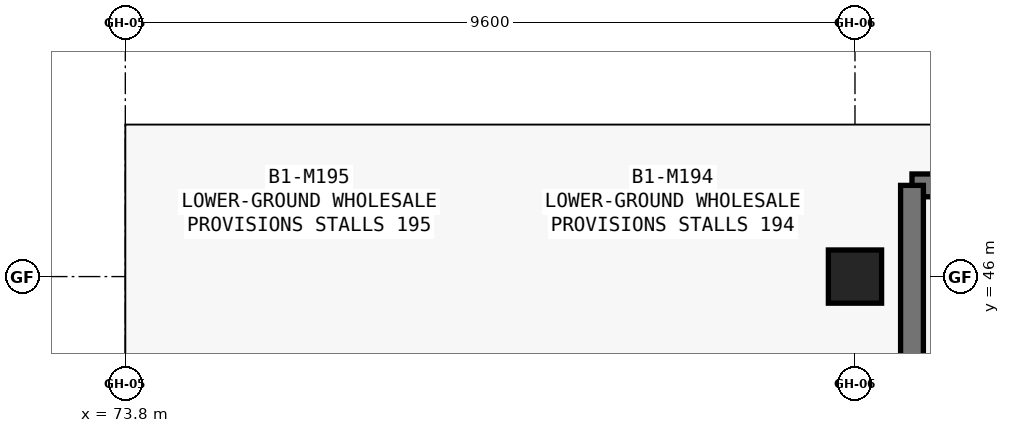
"""IFC4 building model, lengths in metres.
Left out: names, types, materials, properties, quantities, classifications, styles, units other than length and angle.
Written with IfcOpenShell. Run it as: python <this file> out.ifc"""

import sys

from ifc_helpers import new_model, si_unit, direction, frame, frame_2d, origin, origin_2d, place, context, subcontext, project, spatial, rectangle, circle, extrude, element, save


model = new_model("IFC4")
c1 = context("Model", 3, precision=1e-05, world=origin(), true_north=direction((0.0, 1.0)))
c2 = subcontext(c1, "Body", "Model", "MODEL_VIEW")
j1 = project(units=[si_unit("LENGTHUNIT", "METRE"), si_unit("PLANEANGLEUNIT", "RADIAN")], contexts=[c1])
p1 = place(None, origin())
s1 = spatial("IfcSite", under=j1, at=p1, CompositionType="ELEMENT")
p2 = place(p1, origin())
s2 = spatial("IfcBuilding", under=s1, at=p2, CompositionType="ELEMENT")
p3 = place(p2, frame((0.0, 0.0, -5.4)))
s3 = spatial("IfcBuildingStorey", under=s2, at=p3, CompositionType="ELEMENT", Elevation=-5.4)
p4 = place(p3, frame((83.4, 46.0, 0.0), z_axis=(0.0, 0.0, 1.0), x_axis=(1.0, 0.0, 0.0)))
e1 = element("IfcColumn", 1, at=p4, inside=s3, PredefinedType="COLUMN", context=c2, shape_type="SweptSolid", body=[
    extrude(circle(Radius=0.35, at=origin_2d()), origin(), (0.0, 0.0, 1.0), 5.4),
])
p5 = place(p3, frame((88.25, 47.2, 0.0), z_axis=(0.0, 0.0, 1.0), x_axis=(-1.0, 0.0, 0.0)))
e2 = element("IfcWall", 2, at=p5, inside=s3, PredefinedType="SHEAR", context=c2, shape_type="SweptSolid", body=[
    extrude(rectangle(XDim=4.1, YDim=0.3, at=frame_2d((2.05, 0.0))), origin(), (0.0, 0.0, 1.0), 5.4),
])
p6 = place(p3, frame((84.15, 47.2, 0.0), z_axis=(0.0, 0.0, 1.0), x_axis=(0.0, -1.0, 0.0)))
e3 = element("IfcWall", 3, at=p6, inside=s3, PredefinedType="SHEAR", context=c2, shape_type="SweptSolid", body=[
    extrude(rectangle(XDim=8.7, YDim=0.3, at=frame_2d((4.35, 0.0))), origin(), (0.0, 0.0, 1.0), 5.4),
])
save(model, sys.argv[1])
